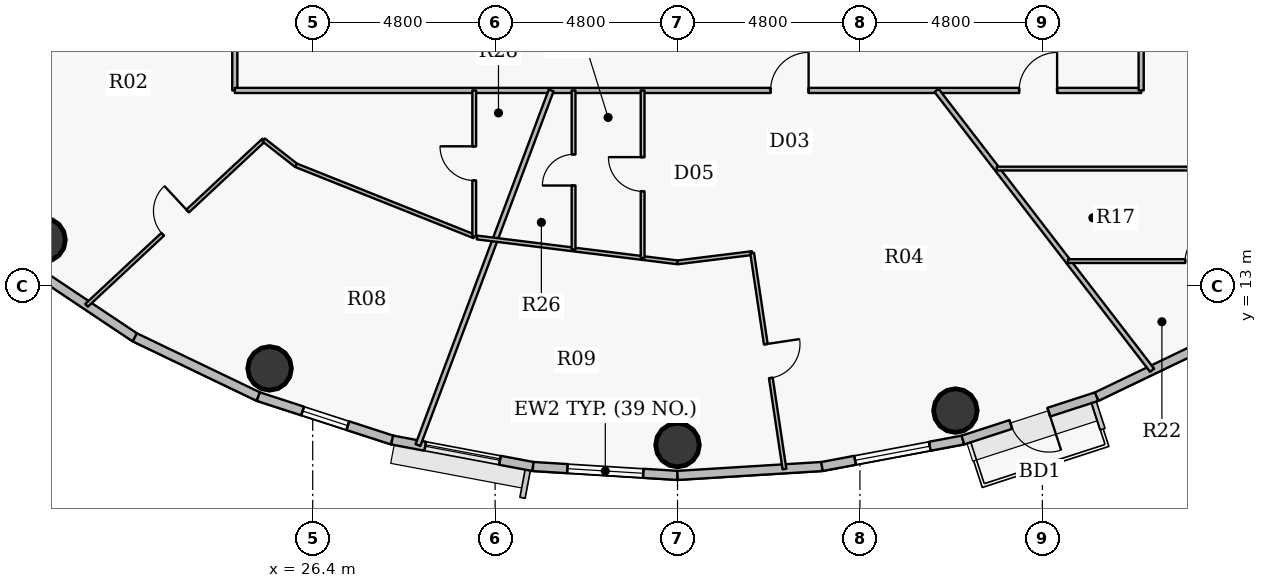
"""IFC4 building model, lengths in metres.
Left out: names, types, materials, properties, quantities, classifications, styles, units other than length and angle.
Written with IfcOpenShell. Run it as: python <this file> out.ifc"""

import sys

from ifc_helpers import new_model, si_unit, direction, frame, frame_2d, origin, origin_2d, place, context, subcontext, project, spatial, rectangle, hollow_circle, extrude, source, transform, mapped, element, fill, save


model = new_model("IFC4")
c1 = context("Model", 3, precision=1e-05, world=origin(), true_north=direction((0.0, 1.0)))
c2 = subcontext(c1, "Body", "Model", "MODEL_VIEW")
j1 = project(units=[si_unit("LENGTHUNIT", "METRE"), si_unit("PLANEANGLEUNIT", "RADIAN")], contexts=[c1])
p1 = place(None, origin())
s1 = spatial("IfcSite", under=j1, at=p1, CompositionType="ELEMENT")
p2 = place(p1, origin())
s2 = spatial("IfcBuilding", under=s1, at=p2, CompositionType="ELEMENT")
p3 = place(p2, frame((0.0, 0.0, 225.3)))
s3 = spatial("IfcBuildingStorey", under=s2, at=p3, CompositionType="ELEMENT", Elevation=225.3)
for number, where, z_axis, x_axis in (
    (1, (19.317, 14.219, 0.0), (0.0, 0.0, 1.0), (1.0, 0.0, 0.0)),
    (2, (25.265, 10.836, 0.0), (0.0, 0.0, 1.0), (1.0, 0.0, 0.0)),
    (3, (36.0, 8.82, 0.0), (0.0, 0.0, 1.0), (1.0, 0.0, 0.0)),
    (4, (43.312, 9.727, 0.0), (0.0, 0.0, 1.0), (1.0, 0.0, 0.0)),
):
    element("IfcColumn", number, at=place(p3, frame(where, z_axis=z_axis, x_axis=x_axis)), inside=s3, PredefinedType="COLUMN", context=c2, shape_type="SweptSolid", body=[
        extrude(hollow_circle(Radius=0.575, WallThickness=0.036, at=origin_2d()), origin(), (0.0, 0.0, 1.0), 3.75),
    ])
p4 = place(p3, frame((21.72, 11.652, 0.0), z_axis=(0.0, 0.0, 1.0), x_axis=(-0.831262496074, 0.555880079352, 0.0)))
e5 = element("IfcWall", 5, at=p4, inside=s3, PredefinedType="SOLIDWALL", context=c2, shape_type="SweptSolid", body=[
    extrude(rectangle(XDim=3.484, YDim=0.24, at=frame_2d((1.742, 0.0))), origin(), (0.0, 0.0, 1.0), 3.5),
])
p5 = place(p3, frame((24.969, 10.094, 0.0), z_axis=(0.0, 0.0, 1.0), x_axis=(-0.901598104751, 0.432574684313, 0.0)))
e6 = element("IfcWall", 6, at=p5, inside=s3, PredefinedType="SOLIDWALL", context=c2, shape_type="SweptSolid", body=[
    extrude(rectangle(XDim=3.604, YDim=0.24, at=frame_2d((1.802, 0.0))), origin(), (0.0, 0.0, 1.0), 3.5),
])
p6 = place(p3, frame((28.491, 8.951, 0.0), z_axis=(0.0, 0.0, 1.0), x_axis=(-0.951210789182, 0.308541787354, 0.0)))
e7 = element("IfcWall", 7, at=p6, inside=s3, PredefinedType="SOLIDWALL", context=c2, shape_type="SweptSolid", body=[
    extrude(rectangle(XDim=3.702, YDim=0.24, at=frame_2d((1.851, 0.0))), origin(), (0.0, 0.0, 1.0), 3.5),
])
p7 = place(p6, frame((1.226, 0.0, 0.9)))
e8 = element("IfcOpeningElement", 8, at=p7, cuts=e7, PredefinedType="OPENING", context=c2, shape_type="SweptSolid", body=[
    extrude(rectangle(XDim=1.25, YDim=1.65, at=origin_2d()), frame((0.625, 0.13, 0.825), z_axis=(0.0, -1.0, 0.0), x_axis=(1.0, 0.0, 0.0)), (0.0, 0.0, 1.0), 0.26),
])
p8 = place(p3, frame((32.198, 8.254, 0.0), z_axis=(0.0, 0.0, 1.0), x_axis=(-0.982784898575, 0.184753465822, 0.0)))
e9 = element("IfcWall", 9, at=p8, inside=s3, PredefinedType="SOLIDWALL", context=c2, shape_type="SweptSolid", body=[
    extrude(rectangle(XDim=3.773, YDim=0.24, at=frame_2d((1.886, 0.0))), origin(), (0.0, 0.0, 1.0), 3.5),
])
p9 = place(p8, frame((0.886, 0.0, 0.9)))
e10 = element("IfcOpeningElement", 10, at=p9, cuts=e9, PredefinedType="OPENING", context=c2, shape_type="SweptSolid", body=[
    extrude(rectangle(XDim=2.0, YDim=1.75, at=origin_2d()), frame((1.0, 0.13, 0.875), z_axis=(0.0, -1.0, 0.0), x_axis=(1.0, 0.0, 0.0)), (0.0, 0.0, 1.0), 0.26),
])
p10 = place(p3, frame((36.0, 8.02, 0.0), z_axis=(0.0, 0.0, 1.0), x_axis=(-0.998108785312, 0.06147237333, 0.0)))
e11 = element("IfcWall", 11, at=p10, inside=s3, PredefinedType="SOLIDWALL", context=c2, shape_type="SweptSolid", body=[
    extrude(rectangle(XDim=3.809, YDim=0.24, at=frame_2d((1.904, 0.0))), origin(), (0.0, 0.0, 1.0), 3.5),
])
p11 = place(p10, frame((0.904, 0.0, 0.9)))
e12 = element("IfcOpeningElement", 12, at=p11, cuts=e11, PredefinedType="OPENING", context=c2, shape_type="SweptSolid", body=[
    extrude(rectangle(XDim=2.0, YDim=1.75, at=origin_2d()), frame((1.0, 0.13, 0.875), z_axis=(0.0, -1.0, 0.0), x_axis=(1.0, 0.0, 0.0)), (0.0, 0.0, 1.0), 0.26),
])
p12 = place(p3, frame((39.802, 8.254, 0.0), z_axis=(0.0, 0.0, 1.0), x_axis=(-0.998108785312, -0.06147237333, 0.0)))
e13 = element("IfcWall", 13, at=p12, inside=s3, PredefinedType="SOLIDWALL", context=c2, shape_type="SweptSolid", body=[
    extrude(rectangle(XDim=3.809, YDim=0.24, at=frame_2d((1.904, 0.0))), origin(), (0.0, 0.0, 1.0), 3.5),
])
p13 = place(p3, frame((43.509, 8.951, 0.0), z_axis=(0.0, 0.0, 1.0), x_axis=(-0.982784898575, -0.184753465822, 0.0)))
e14 = element("IfcWall", 14, at=p13, inside=s3, PredefinedType="SOLIDWALL", context=c2, shape_type="SweptSolid", body=[
    extrude(rectangle(XDim=3.773, YDim=0.24, at=frame_2d((1.886, 0.0))), origin(), (0.0, 0.0, 1.0), 3.5),
])
p14 = place(p13, frame((0.886, 0.0, 0.9)))
e15 = element("IfcOpeningElement", 15, at=p14, cuts=e14, PredefinedType="OPENING", context=c2, shape_type="SweptSolid", body=[
    extrude(rectangle(XDim=2.0, YDim=1.75, at=origin_2d()), frame((1.0, 0.13, 0.875), z_axis=(0.0, -1.0, 0.0), x_axis=(1.0, 0.0, 0.0)), (0.0, 0.0, 1.0), 0.26),
])
p15 = place(p3, frame((47.031, 10.094, 0.0), z_axis=(0.0, 0.0, 1.0), x_axis=(-0.951210789182, -0.308541787354, 0.0)))
e16 = element("IfcWall", 16, at=p15, inside=s3, PredefinedType="SOLIDWALL", context=c2, shape_type="SweptSolid", body=[
    extrude(rectangle(XDim=3.702, YDim=0.24, at=frame_2d((1.851, 0.0))), origin(), (0.0, 0.0, 1.0), 3.5),
])
p16 = place(p15, frame((1.326, 0.0, 0.0)))
e17 = element("IfcOpeningElement", 17, at=p16, cuts=e16, PredefinedType="OPENING", context=c2, shape_type="SweptSolid", body=[
    extrude(rectangle(XDim=1.05, YDim=2.15, at=origin_2d()), frame((0.525, 0.13, 1.075), z_axis=(0.0, -1.0, 0.0), x_axis=(1.0, 0.0, 0.0)), (0.0, 0.0, 1.0), 0.26),
])
p17 = place(p3, frame((50.28, 11.652, 0.0), z_axis=(0.0, 0.0, 1.0), x_axis=(-0.901598104751, -0.432574684313, 0.0)))
e18 = element("IfcWall", 18, at=p17, inside=s3, PredefinedType="SOLIDWALL", context=c2, shape_type="SweptSolid", body=[
    extrude(rectangle(XDim=3.604, YDim=0.24, at=frame_2d((1.802, 0.0))), origin(), (0.0, 0.0, 1.0), 3.5),
])
p18 = place(p3, frame((20.449, 12.496, 0.0), z_axis=(0.0, 0.0, 1.0), x_axis=(0.731298421662, 0.682057635743, 0.0)))
e19 = element("IfcWall", 19, at=p18, inside=s3, PredefinedType="PARTITIONING", context=c2, shape_type="SweptSolid", body=[
    extrude(rectangle(XDim=6.376, YDim=0.1, at=frame_2d((3.188, 0.0))), origin(), (0.0, 0.0, 1.0), 2.985),
])
p19 = place(p18, frame((2.738, 0.0, 0.0)))
e20 = element("IfcOpeningElement", 20, at=p19, cuts=e19, PredefinedType="OPENING", context=c2, shape_type="SweptSolid", body=[
    extrude(rectangle(XDim=0.9, YDim=2.1, at=origin_2d()), frame((0.45, 0.06, 1.05), z_axis=(0.0, -1.0, 0.0), x_axis=(1.0, 0.0, 0.0)), (0.0, 0.0, 1.0), 0.12),
])
p20 = place(p3, frame((24.35, 18.15, 0.0), z_axis=(0.0, 0.0, 1.0), x_axis=(0.0, 1.0, 0.0)))
e21 = element("IfcWall", 21, at=p20, inside=s3, PredefinedType="PARTITIONING", context=c2, shape_type="SweptSolid", body=[
    extrude(rectangle(XDim=7.9, YDim=0.135, at=frame_2d((3.95, 0.0))), origin(), (0.0, 0.0, 1.0), 2.935),
])
p21 = place(p20, frame((3.45, 0.0, 0.0)))
e22 = element("IfcOpeningElement", 22, at=p21, cuts=e21, PredefinedType="OPENING", context=c2, shape_type="SweptSolid", body=[
    extrude(rectangle(XDim=1.0, YDim=2.15, at=origin_2d()), frame((0.5, 0.078, 1.075), z_axis=(0.0, -1.0, 0.0), x_axis=(1.0, 0.0, 0.0)), (0.0, 0.0, 1.0), 0.155),
])
p22 = place(p3, frame((24.35, 18.15, 0.0), z_axis=(0.0, 0.0, 1.0), x_axis=(1.0, 0.0, 0.0)))
e23 = element("IfcWall", 23, at=p22, inside=s3, PredefinedType="PARTITIONING", context=c2, shape_type="SweptSolid", body=[
    extrude(rectangle(XDim=23.85, YDim=0.135, at=frame_2d((11.925, 0.0))), origin(), (0.0, 0.0, 1.0), 2.935),
])
p23 = place(p22, frame((14.099, 0.0, 0.0)))
e24 = element("IfcOpeningElement", 24, at=p23, cuts=e23, PredefinedType="OPENING", context=c2, shape_type="SweptSolid", body=[
    extrude(rectangle(XDim=1.0, YDim=2.15, at=origin_2d()), frame((0.5, 0.078, 1.075), z_axis=(0.0, -1.0, 0.0), x_axis=(1.0, 0.0, 0.0)), (0.0, 0.0, 1.0), 0.155),
])
p24 = place(p22, frame((20.638, 0.0, 0.0)))
e25 = element("IfcOpeningElement", 25, at=p24, cuts=e23, PredefinedType="OPENING", context=c2, shape_type="SweptSolid", body=[
    extrude(rectangle(XDim=1.0, YDim=2.15, at=origin_2d()), frame((0.5, 0.078, 1.075), z_axis=(0.0, -1.0, 0.0), x_axis=(1.0, 0.0, 0.0)), (0.0, 0.0, 1.0), 0.155),
])
p25 = place(p3, frame((25.112, 16.845, 0.0), z_axis=(0.0, 0.0, 1.0), x_axis=(0.787433290794, -0.616399880394, 0.0)))
e26 = element("IfcWall", 26, at=p25, inside=s3, PredefinedType="PARTITIONING", context=c2, shape_type="SweptSolid", body=[
    extrude(rectangle(XDim=1.078, YDim=0.1, at=frame_2d((0.539, 0.0))), origin(), (0.0, 0.0, 1.0), 3.5),
])
p26 = place(p3, frame((25.961, 16.181, 0.0), z_axis=(0.0, 0.0, 1.0), x_axis=(0.928803127631, -0.370573542098, 0.0)))
e27 = element("IfcWall", 27, at=p26, inside=s3, PredefinedType="PARTITIONING", context=c2, shape_type="SweptSolid", body=[
    extrude(rectangle(XDim=5.049, YDim=0.1, at=frame_2d((2.524, 0.0))), origin(), (0.0, 0.0, 1.0), 2.935),
])
p27 = place(p3, frame((29.169, 8.819, 0.0), z_axis=(0.0, 0.0, 1.0), x_axis=(0.351676288836, 0.936121673646, 0.0)))
e28 = element("IfcWall", 28, at=p27, inside=s3, PredefinedType="PARTITIONING", context=c2, shape_type="SweptSolid", body=[
    extrude(rectangle(XDim=9.968, YDim=0.135, at=frame_2d((4.984, 0.0))), origin(), (0.0, 0.0, 1.0), 2.985),
])
p28 = place(p3, frame((30.65, 14.31, 0.0), z_axis=(0.0, 0.0, 1.0), x_axis=(0.0, 1.0, 0.0)))
e29 = element("IfcWall", 29, at=p28, inside=s3, PredefinedType="PARTITIONING", context=c2, shape_type="SweptSolid", body=[
    extrude(rectangle(XDim=3.84, YDim=0.1, at=frame_2d((1.92, 0.0))), origin(), (0.0, 0.0, 1.0), 3.5),
])
p29 = place(p28, frame((1.47, 0.0, 0.0)))
e30 = element("IfcOpeningElement", 30, at=p29, cuts=e29, PredefinedType="OPENING", context=c2, shape_type="SweptSolid", body=[
    extrude(rectangle(XDim=0.9, YDim=2.1, at=origin_2d()), frame((0.45, 0.06, 1.05), z_axis=(0.0, -1.0, 0.0), x_axis=(1.0, 0.0, 0.0)), (0.0, 0.0, 1.0), 0.12),
])
p30 = place(p3, frame((30.722, 14.281, 0.0), z_axis=(0.0, 0.0, 1.0), x_axis=(0.992398169186, -0.123068573551, 0.0)))
e31 = element("IfcWall", 31, at=p30, inside=s3, PredefinedType="PARTITIONING", context=c2, shape_type="SweptSolid", body=[
    extrude(rectangle(XDim=5.319, YDim=0.1, at=frame_2d((2.659, 0.0))), origin(), (0.0, 0.0, 1.0), 2.935),
])
p31 = place(p3, frame((33.264, 13.966, 0.0), z_axis=(0.0, 0.0, 1.0), x_axis=(0.0, 1.0, 0.0)))
e32 = element("IfcWall", 32, at=p31, inside=s3, PredefinedType="PARTITIONING", context=c2, shape_type="SweptSolid", body=[
    extrude(rectangle(XDim=4.184, YDim=0.1, at=frame_2d((2.092, 0.0))), origin(), (0.0, 0.0, 1.0), 3.5),
])
p32 = place(p31, frame((1.682, 0.0, 0.0)))
e33 = element("IfcOpeningElement", 33, at=p32, cuts=e32, PredefinedType="OPENING", context=c2, shape_type="SweptSolid", body=[
    extrude(rectangle(XDim=0.82, YDim=2.1, at=origin_2d()), frame((0.41, 0.06, 1.05), z_axis=(0.0, -1.0, 0.0), x_axis=(1.0, 0.0, 0.0)), (0.0, 0.0, 1.0), 0.12),
])
p33 = place(p3, frame((35.082, 13.74, 0.0), z_axis=(0.0, 0.0, 1.0), x_axis=(0.0, 1.0, 0.0)))
e34 = element("IfcWall", 34, at=p33, inside=s3, PredefinedType="PARTITIONING", context=c2, shape_type="SweptSolid", body=[
    extrude(rectangle(XDim=4.409, YDim=0.1, at=frame_2d((2.205, 0.0))), origin(), (0.0, 0.0, 1.0), 3.5),
])
p34 = place(p33, frame((1.755, 0.0, 0.0)))
e35 = element("IfcOpeningElement", 35, at=p34, cuts=e34, PredefinedType="OPENING", context=c2, shape_type="SweptSolid", body=[
    extrude(rectangle(XDim=0.9, YDim=2.1, at=origin_2d()), frame((0.45, 0.06, 1.05), z_axis=(0.0, -1.0, 0.0), x_axis=(1.0, 0.0, 0.0)), (0.0, 0.0, 1.0), 0.12),
])
p35 = place(p3, frame((36.0, 13.626, 0.0), z_axis=(0.0, 0.0, 1.0), x_axis=(0.992393208717, 0.123108567097, 0.0)))
e36 = element("IfcWall", 36, at=p35, inside=s3, PredefinedType="PARTITIONING", context=c2, shape_type="SweptSolid", body=[
    extrude(rectangle(XDim=1.979, YDim=0.1, at=frame_2d((0.99, 0.0))), origin(), (0.0, 0.0, 1.0), 2.935),
])
p36 = place(p3, frame((37.964, 13.87, 0.0), z_axis=(0.0, 0.0, 1.0), x_axis=(0.147933131181, -0.988997365365, 0.0)))
e37 = element("IfcWall", 37, at=p36, inside=s3, PredefinedType="PARTITIONING", context=c2, shape_type="SweptSolid", body=[
    extrude(rectangle(XDim=5.745, YDim=0.1, at=frame_2d((2.873, 0.0))), origin(), (0.0, 0.0, 1.0), 2.985),
])
p37 = place(p36, frame((2.422, 0.0, 0.0)))
e38 = element("IfcOpeningElement", 38, at=p37, cuts=e37, PredefinedType="OPENING", context=c2, shape_type="SweptSolid", body=[
    extrude(rectangle(XDim=0.9, YDim=2.1, at=origin_2d()), frame((0.45, 0.06, 1.05), z_axis=(0.0, -1.0, 0.0), x_axis=(1.0, 0.0, 0.0)), (0.0, 0.0, 1.0), 0.12),
])
p38 = place(p3, frame((42.817, 18.15, 0.0), z_axis=(0.0, 0.0, 1.0), x_axis=(0.610231128601, -0.792223434194, 0.0)))
e39 = element("IfcWall", 39, at=p38, inside=s3, PredefinedType="PARTITIONING", context=c2, shape_type="SweptSolid", body=[
    extrude(rectangle(XDim=9.294, YDim=0.135, at=frame_2d((4.647, 0.0))), origin(), (0.0, 0.0, 1.0), 2.985),
])
p39 = place(p3, frame((44.401, 16.094, 0.0), z_axis=(0.0, 0.0, 1.0), x_axis=(1.0, 0.0, 0.0)))
e40 = element("IfcWall", 40, at=p39, inside=s3, PredefinedType="PARTITIONING", context=c2, shape_type="SweptSolid", body=[
    extrude(rectangle(XDim=11.441, YDim=0.1, at=frame_2d((5.72, 0.0))), origin(), (0.0, 0.0, 1.0), 2.935),
])
p40 = place(p39, frame((5.271, 0.0, 0.0)))
e41 = element("IfcOpeningElement", 41, at=p40, cuts=e40, PredefinedType="OPENING", context=c2, shape_type="SweptSolid", body=[
    extrude(rectangle(XDim=0.9, YDim=2.1, at=origin_2d()), frame((0.45, 0.06, 1.05), z_axis=(0.0, -1.0, 0.0), x_axis=(1.0, 0.0, 0.0)), (0.0, 0.0, 1.0), 0.12),
])
p41 = place(p3, frame((46.276, 13.659, 0.0), z_axis=(0.0, 0.0, 1.0), x_axis=(1.0, 0.0, 0.0)))
e42 = element("IfcWall", 42, at=p41, inside=s3, PredefinedType="PARTITIONING", context=c2, shape_type="SweptSolid", body=[
    extrude(rectangle(XDim=6.984, YDim=0.1, at=frame_2d((3.492, 0.0))), origin(), (0.0, 0.0, 1.0), 2.985),
])
p42 = place(p41, frame((3.082, 0.0, 0.0)))
e43 = element("IfcOpeningElement", 43, at=p42, cuts=e42, PredefinedType="OPENING", context=c2, shape_type="SweptSolid", body=[
    extrude(rectangle(XDim=0.82, YDim=2.1, at=origin_2d()), frame((0.41, 0.06, 1.05), z_axis=(0.0, -1.0, 0.0), x_axis=(1.0, 0.0, 0.0)), (0.0, 0.0, 1.0), 0.12),
])
p43 = place(p3, frame((48.2, 18.15, 0.0), z_axis=(0.0, 0.0, 1.0), x_axis=(0.0, 1.0, 0.0)))
e44 = element("IfcWall", 44, at=p43, inside=s3, PredefinedType="PARTITIONING", context=c2, shape_type="SweptSolid", body=[
    extrude(rectangle(XDim=1.9, YDim=0.135, at=frame_2d((0.95, 0.0))), origin(), (0.0, 0.0, 1.0), 3.5),
])
m1 = source(origin(), c2, "Body", "SweptSolid", [
    extrude(rectangle(XDim=2.0, YDim=1.75, at=origin_2d()), frame((1.0, 0.03, 0.875), z_axis=(0.0, -1.0, 0.0), x_axis=(1.0, 0.0, 0.0)), (0.0, 0.0, 1.0), 0.06),
])
p44 = place(p9, origin())
e45 = element("IfcWindow", 45, at=p44, inside=s3, PartitioningType="DOUBLE_PANEL_VERTICAL", PredefinedType="WINDOW", context=c2, shape_type="MappedRepresentation", body=[
    mapped(m1, transform((0.0, 0.0, 0.0), x_axis=(1.0, 0.0, 0.0), y_axis=(0.0, 1.0, 0.0), z_axis=(0.0, 0.0, 1.0), scale=1.0)),
])
fill(e10, e45)
p45 = place(p11, origin())
e46 = element("IfcWindow", 46, at=p45, inside=s3, PartitioningType="DOUBLE_PANEL_VERTICAL", PredefinedType="WINDOW", context=c2, shape_type="MappedRepresentation", body=[
    mapped(m1, transform((0.0, 0.0, 0.0), x_axis=(1.0, 0.0, 0.0), y_axis=(0.0, 1.0, 0.0), z_axis=(0.0, 0.0, 1.0), scale=1.0)),
])
fill(e12, e46)
p46 = place(p14, origin())
e47 = element("IfcWindow", 47, at=p46, inside=s3, PartitioningType="DOUBLE_PANEL_VERTICAL", PredefinedType="WINDOW", context=c2, shape_type="MappedRepresentation", body=[
    mapped(m1, transform((0.0, 0.0, 0.0), x_axis=(1.0, 0.0, 0.0), y_axis=(0.0, 1.0, 0.0), z_axis=(0.0, 0.0, 1.0), scale=1.0)),
])
fill(e15, e47)
m2 = source(origin(), c2, "Body", "SweptSolid", [
    extrude(rectangle(XDim=1.05, YDim=2.15, at=origin_2d()), frame((0.525, 0.025, 1.075), z_axis=(0.0, -1.0, 0.0), x_axis=(1.0, 0.0, 0.0)), (0.0, 0.0, 1.0), 0.05),
])
p47 = place(p16, origin())
e48 = element("IfcDoor", 48, at=p47, inside=s3, OperationType="SINGLE_SWING_LEFT", PredefinedType="DOOR", context=c2, shape_type="MappedRepresentation", body=[
    mapped(m2, transform((0.0, 0.0, 0.0), x_axis=(1.0, 0.0, 0.0), y_axis=(0.0, 1.0, 0.0), z_axis=(0.0, 0.0, 1.0), scale=1.0)),
])
fill(e17, e48)
m3 = source(origin(), c2, "Body", "SweptSolid", [
    extrude(rectangle(XDim=1.25, YDim=1.65, at=origin_2d()), frame((0.625, 0.03, 0.825), z_axis=(0.0, -1.0, 0.0), x_axis=(1.0, 0.0, 0.0)), (0.0, 0.0, 1.0), 0.06),
])
p48 = place(p7, origin())
e49 = element("IfcWindow", 49, at=p48, inside=s3, PartitioningType="SINGLE_PANEL", PredefinedType="WINDOW", context=c2, shape_type="MappedRepresentation", body=[
    mapped(m3, transform((0.0, 0.0, 0.0), x_axis=(1.0, 0.0, 0.0), y_axis=(0.0, 1.0, 0.0), z_axis=(0.0, 0.0, 1.0), scale=1.0)),
])
fill(e8, e49)
m4 = source(origin(), c2, "Body", "SweptSolid", [
    extrude(rectangle(XDim=0.9, YDim=2.1, at=origin_2d()), frame((0.45, 0.025, 1.05), z_axis=(0.0, -1.0, 0.0), x_axis=(1.0, 0.0, 0.0)), (0.0, 0.0, 1.0), 0.05),
])
p49 = place(p19, origin())
e50 = element("IfcDoor", 50, at=p49, inside=s3, OperationType="SINGLE_SWING_RIGHT", PredefinedType="DOOR", context=c2, shape_type="MappedRepresentation", body=[
    mapped(m4, transform((0.0, 0.0, 0.0), x_axis=(1.0, 0.0, 0.0), y_axis=(0.0, 1.0, 0.0), z_axis=(0.0, 0.0, 1.0), scale=1.0)),
])
fill(e20, e50)
p50 = place(p29, origin())
e51 = element("IfcDoor", 51, at=p50, inside=s3, OperationType="SINGLE_SWING_RIGHT", PredefinedType="DOOR", context=c2, shape_type="MappedRepresentation", body=[
    mapped(m4, transform((0.0, 0.0, 0.0), x_axis=(1.0, 0.0, 0.0), y_axis=(0.0, 1.0, 0.0), z_axis=(0.0, 0.0, 1.0), scale=1.0)),
])
fill(e30, e51)
m5 = source(origin(), c2, "Body", "SweptSolid", [
    extrude(rectangle(XDim=1.0, YDim=2.15, at=origin_2d()), frame((0.5, 0.025, 1.075), z_axis=(0.0, -1.0, 0.0), x_axis=(1.0, 0.0, 0.0)), (0.0, 0.0, 1.0), 0.05),
])
p51 = place(p23, origin())
e52 = element("IfcDoor", 52, at=p51, inside=s3, OperationType="SINGLE_SWING_RIGHT", PredefinedType="DOOR", context=c2, shape_type="MappedRepresentation", body=[
    mapped(m5, transform((0.0, 0.0, 0.0), x_axis=(1.0, 0.0, 0.0), y_axis=(0.0, 1.0, 0.0), z_axis=(0.0, 0.0, 1.0), scale=1.0)),
])
fill(e24, e52)
p52 = place(p37, origin())
e53 = element("IfcDoor", 53, at=p52, inside=s3, OperationType="SINGLE_SWING_LEFT", PredefinedType="DOOR", context=c2, shape_type="MappedRepresentation", body=[
    mapped(m4, transform((0.0, 0.0, 0.0), x_axis=(1.0, 0.0, 0.0), y_axis=(0.0, 1.0, 0.0), z_axis=(0.0, 0.0, 1.0), scale=1.0)),
])
fill(e38, e53)
p53 = place(p34, origin())
e54 = element("IfcDoor", 54, at=p53, inside=s3, OperationType="SINGLE_SWING_RIGHT", PredefinedType="DOOR", context=c2, shape_type="MappedRepresentation", body=[
    mapped(m4, transform((0.0, 0.0, 0.0), x_axis=(1.0, 0.0, 0.0), y_axis=(0.0, 1.0, 0.0), z_axis=(0.0, 0.0, 1.0), scale=1.0)),
])
fill(e35, e54)
m6 = source(origin(), c2, "Body", "SweptSolid", [
    extrude(rectangle(XDim=0.82, YDim=2.1, at=origin_2d()), frame((0.41, 0.025, 1.05), z_axis=(0.0, -1.0, 0.0), x_axis=(1.0, 0.0, 0.0)), (0.0, 0.0, 1.0), 0.05),
])
p54 = place(p32, origin())
e55 = element("IfcDoor", 55, at=p54, inside=s3, OperationType="SINGLE_SWING_LEFT", PredefinedType="DOOR", context=c2, shape_type="MappedRepresentation", body=[
    mapped(m6, transform((0.0, 0.0, 0.0), x_axis=(1.0, 0.0, 0.0), y_axis=(0.0, 1.0, 0.0), z_axis=(0.0, 0.0, 1.0), scale=1.0)),
])
fill(e33, e55)
p55 = place(p24, origin())
e56 = element("IfcDoor", 56, at=p55, inside=s3, OperationType="SINGLE_SWING_RIGHT", PredefinedType="DOOR", context=c2, shape_type="MappedRepresentation", body=[
    mapped(m5, transform((0.0, 0.0, 0.0), x_axis=(1.0, 0.0, 0.0), y_axis=(0.0, 1.0, 0.0), z_axis=(0.0, 0.0, 1.0), scale=1.0)),
])
fill(e25, e56)
p56 = place(p42, origin())
e57 = element("IfcDoor", 57, at=p56, inside=s3, OperationType="SINGLE_SWING_RIGHT", PredefinedType="DOOR", context=c2, shape_type="MappedRepresentation", body=[
    mapped(m6, transform((0.0, 0.0, 0.0), x_axis=(1.0, 0.0, 0.0), y_axis=(0.0, 1.0, 0.0), z_axis=(0.0, 0.0, 1.0), scale=1.0)),
])
fill(e43, e57)
save(model, sys.argv[1])
